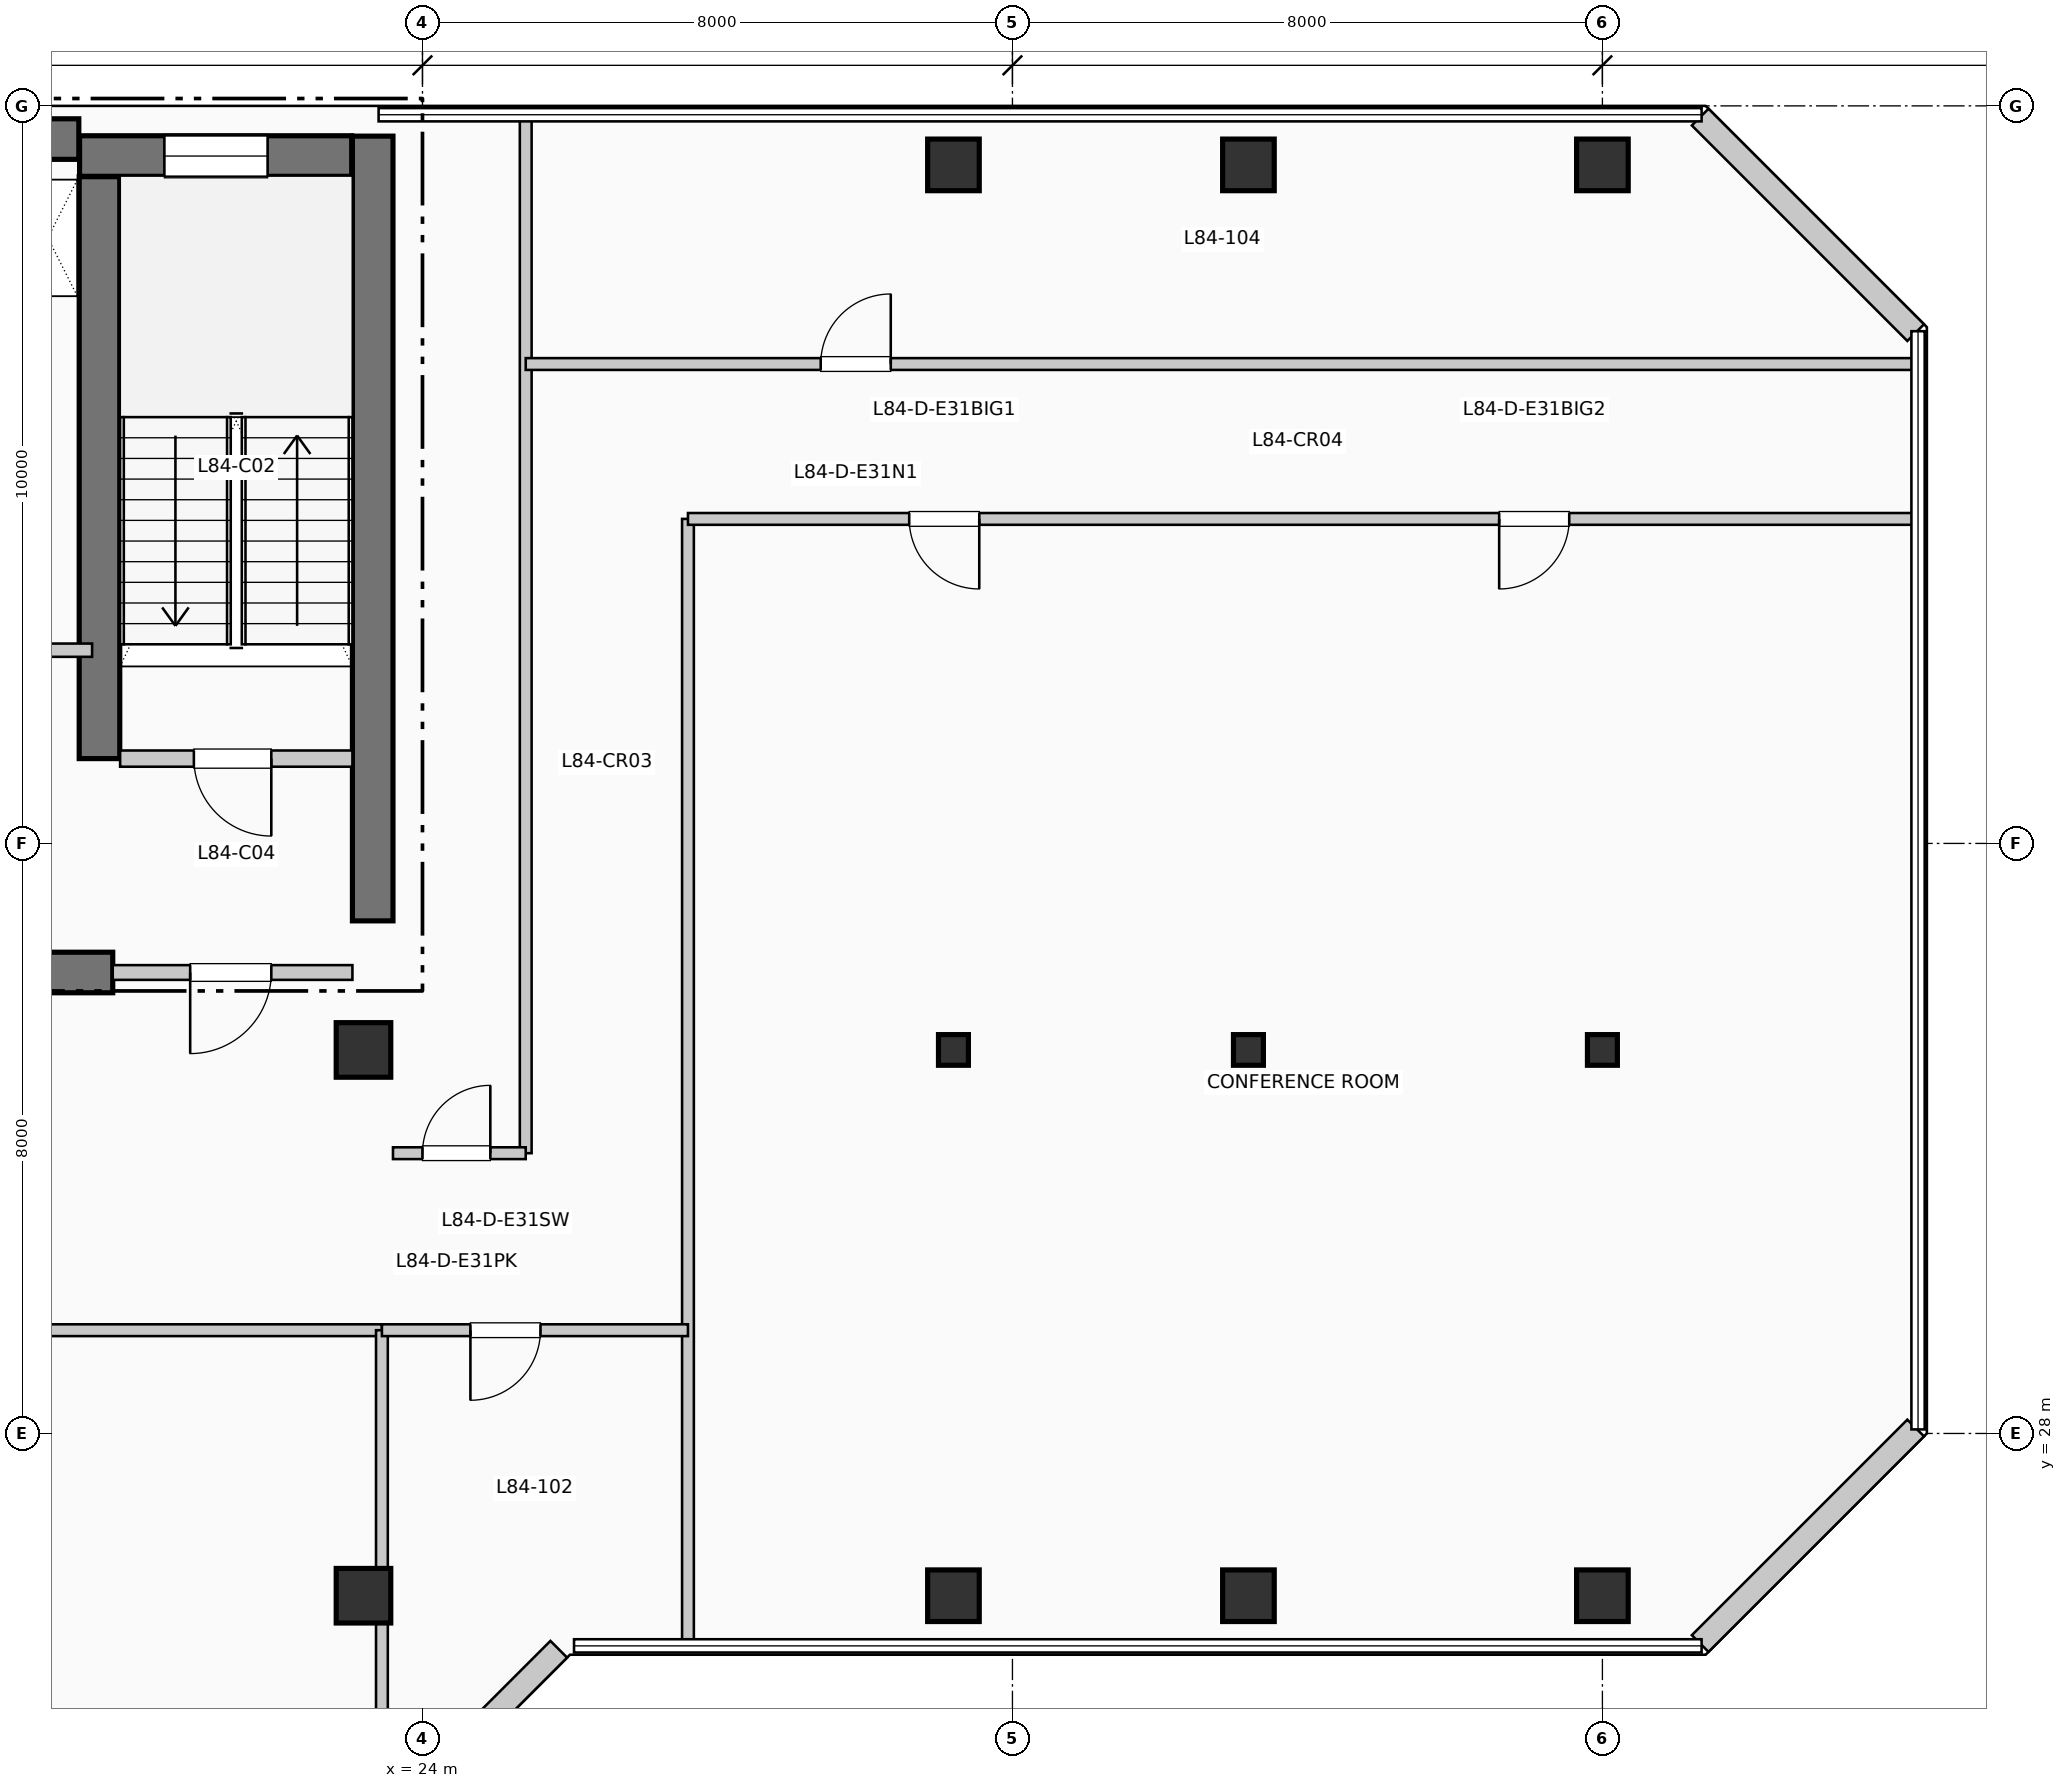
"""IFC4 building model, lengths in metres.
Left out: names, types, materials, properties, quantities, classifications, styles, units other than length and angle.
Written with IfcOpenShell. Run it as: python <this file> out.ifc"""

import sys

from ifc_helpers import new_model, si_unit, direction, frame, frame_2d, origin, origin_2d, place, context, subcontext, project, spatial, rectangle, i_section, extrude, element, fill, save


model = new_model("IFC4")
c1 = context("Model", 3, precision=1e-05, world=origin(), true_north=direction((0.0, 1.0)))
c2 = subcontext(c1, "Body", "Model", "MODEL_VIEW")
j1 = project(units=[si_unit("LENGTHUNIT", "METRE"), si_unit("PLANEANGLEUNIT", "RADIAN")], contexts=[c1])
p1 = place(None, origin())
s1 = spatial("IfcSite", under=j1, at=p1, CompositionType="ELEMENT")
p2 = place(p1, origin())
s2 = spatial("IfcBuilding", under=s1, at=p2, CompositionType="ELEMENT")
p3 = place(p2, frame((0.0, 0.0, 343.53)))
s3 = spatial("IfcBuildingStorey", under=s2, at=p3, CompositionType="ELEMENT", Elevation=343.53)
p4 = place(p3, frame((5.36, 45.55, 0.0), z_axis=(0.0, 0.0, 1.0), x_axis=(1.0, 0.0, 0.0)))
e1 = element("IfcWall", 1, at=p4, inside=s3, PredefinedType="SHEAR", context=c2, shape_type="SweptSolid", body=[
    extrude(rectangle(XDim=13.98, YDim=0.55, at=frame_2d((6.99, 0.0))), origin(), (0.0, 0.0, 1.0), 3.96),
])
p5 = place(p3, frame((23.325, 34.95, 0.0), z_axis=(0.0, 0.0, 1.0), x_axis=(0.0, 1.0, 0.0)))
e2 = element("IfcWall", 2, at=p5, inside=s3, PredefinedType="SHEAR", context=c2, shape_type="SweptSolid", body=[
    extrude(rectangle(XDim=10.64, YDim=0.55, at=frame_2d((5.32, 0.0))), origin(), (0.0, 0.0, 1.0), 3.96),
])
p6 = place(p3, frame((13.68, 34.25, 0.0), z_axis=(0.0, 0.0, 1.0), x_axis=(1.0, 0.0, 0.0)))
e3 = element("IfcWall", 3, at=p6, inside=s3, PredefinedType="SHEAR", context=c2, shape_type="SweptSolid", body=[
    extrude(rectangle(XDim=6.12, YDim=0.55, at=frame_2d((3.06, 0.0))), origin(), (0.0, 0.0, 1.0), 3.96),
])
p7 = place(p3, frame((19.62, 37.15, 0.0), z_axis=(0.0, 0.0, 1.0), x_axis=(0.0, 1.0, 0.0)))
e4 = element("IfcWall", 4, at=p7, inside=s3, PredefinedType="SHEAR", context=c2, shape_type="SweptSolid", body=[
    extrude(rectangle(XDim=7.89, YDim=0.55, at=frame_2d((3.945, 0.0))), origin(), (0.0, 0.0, 1.0), 3.96),
])
p8 = place(p3, frame((19.35, 45.32, 0.0), z_axis=(0.0, 0.0, 1.0), x_axis=(1.0, 0.0, 0.0)))
e5 = element("IfcWall", 5, at=p8, inside=s3, PredefinedType="SHEAR", context=c2, shape_type="SweptSolid", body=[
    extrude(rectangle(XDim=3.69, YDim=0.55, at=frame_2d((1.845, 0.0))), origin(), (0.0, 0.0, 1.0), 3.96),
])
p9 = place(p8, frame((1.15, 0.0, 1.05)))
e6 = element("IfcOpeningElement", 6, at=p9, cuts=e5, PredefinedType="OPENING", context=c2, shape_type="SweptSolid", body=[
    extrude(rectangle(XDim=1.4, YDim=1.8, at=frame_2d((0.7, 0.9))), frame((0.0, 0.285, 0.0), z_axis=(0.0, -1.0, 0.0), x_axis=(1.0, 0.0, 0.0)), (0.0, 0.0, 1.0), 0.57),
])
for number, where, z_axis, x_axis in (
    (7, (23.2, 25.8, 0.0), (0.0, 0.0, 1.0), (1.0, 0.0, 0.0)),
    (8, (23.2, 33.2, 0.0), (0.0, 0.0, 1.0), (1.0, 0.0, 0.0)),
):
    element("IfcColumn", number, at=place(p3, frame(where, z_axis=z_axis, x_axis=x_axis)), inside=s3, PredefinedType="COLUMN", context=c2, shape_type="SweptSolid", body=[
        extrude(rectangle(XDim=0.74, YDim=0.74, at=origin_2d()), origin(), (0.0, 0.0, 1.0), 3.96),
    ])
p10 = place(p3, frame((31.2, 25.8, 0.0), z_axis=(0.0, 0.0, 1.0), x_axis=(1.0, 0.0, 0.0)))
e9 = element("IfcColumn", 9, at=p10, inside=s3, PredefinedType="COLUMN", context=c2, shape_type="SweptSolid", body=[
    extrude(rectangle(XDim=0.7, YDim=0.7, at=origin_2d()), origin(), (0.0, 0.0, 1.0), 3.96),
])
p11 = place(p3, frame((31.2, 33.2, 0.0), z_axis=(0.0, 0.0, 1.0), x_axis=(1.0, 0.0, 0.0)))
e10 = element("IfcColumn", 10, at=p11, inside=s3, PredefinedType="COLUMN", context=c2, shape_type="SweptSolid", body=[
    extrude(i_section(OverallWidth=0.406, OverallDepth=0.416, WebThickness=0.022, FlangeThickness=0.036, at=origin_2d()), origin(), (0.0, 0.0, 1.0), 3.96),
])
for number, where, z_axis, x_axis in (
    (11, (31.2, 45.2, 0.0), (0.0, 0.0, 1.0), (1.0, 0.0, 0.0)),
    (12, (35.2, 25.8, 0.0), (0.0, 0.0, 1.0), (1.0, 0.0, 0.0)),
):
    element("IfcColumn", number, at=place(p3, frame(where, z_axis=z_axis, x_axis=x_axis)), inside=s3, PredefinedType="COLUMN", context=c2, shape_type="SweptSolid", body=[
        extrude(rectangle(XDim=0.7, YDim=0.7, at=origin_2d()), origin(), (0.0, 0.0, 1.0), 3.96),
    ])
p12 = place(p3, frame((35.2, 33.2, 0.0), z_axis=(0.0, 0.0, 1.0), x_axis=(1.0, 0.0, 0.0)))
e13 = element("IfcColumn", 13, at=p12, inside=s3, PredefinedType="COLUMN", context=c2, shape_type="SweptSolid", body=[
    extrude(i_section(OverallWidth=0.406, OverallDepth=0.416, WebThickness=0.022, FlangeThickness=0.036, at=origin_2d()), origin(), (0.0, 0.0, 1.0), 3.96),
])
for number, where, z_axis, x_axis in (
    (14, (35.2, 45.2, 0.0), (0.0, 0.0, 1.0), (1.0, 0.0, 0.0)),
    (15, (40.0, 25.8, 0.0), (0.0, 0.0, 1.0), (1.0, 0.0, 0.0)),
):
    element("IfcColumn", number, at=place(p3, frame(where, z_axis=z_axis, x_axis=x_axis)), inside=s3, PredefinedType="COLUMN", context=c2, shape_type="SweptSolid", body=[
        extrude(rectangle(XDim=0.7, YDim=0.7, at=origin_2d()), origin(), (0.0, 0.0, 1.0), 3.96),
    ])
p13 = place(p3, frame((40.0, 33.2, 0.0), z_axis=(0.0, 0.0, 1.0), x_axis=(1.0, 0.0, 0.0)))
e16 = element("IfcColumn", 16, at=p13, inside=s3, PredefinedType="COLUMN", context=c2, shape_type="SweptSolid", body=[
    extrude(i_section(OverallWidth=0.406, OverallDepth=0.416, WebThickness=0.022, FlangeThickness=0.036, at=origin_2d()), origin(), (0.0, 0.0, 1.0), 3.96),
])
p14 = place(p3, frame((40.0, 45.2, 0.0), z_axis=(0.0, 0.0, 1.0), x_axis=(1.0, 0.0, 0.0)))
e17 = element("IfcColumn", 17, at=p14, inside=s3, PredefinedType="COLUMN", context=c2, shape_type="SweptSolid", body=[
    extrude(rectangle(XDim=0.7, YDim=0.7, at=origin_2d()), origin(), (0.0, 0.0, 1.0), 3.96),
])
p15 = place(p3, frame((23.926, 23.152, 0.0), z_axis=(0.0, 0.0, 1.0), x_axis=(0.707106781187, 0.707106781187, 0.0)))
e18 = element("IfcWall", 18, at=p15, inside=s3, PredefinedType="SOLIDWALL", context=c2, shape_type="SweptSolid", body=[
    extrude(rectangle(XDim=2.718, YDim=0.32, at=frame_2d((1.359, 0.0))), origin(), (0.0, 0.0, 1.0), 3.71),
])
for number, where, z_axis, x_axis in (
    (19, (41.326, 25.152, 0.0), (0.0, 0.0, 1.0), (0.707, 0.707, 0.0)),
    (20, (44.248, 42.926, 0.0), (0.0, 0.0, 1.0), (-0.707, 0.707, 0.0)),
):
    element("IfcWall", number, at=place(p3, frame(where, z_axis=z_axis, x_axis=x_axis)), inside=s3, PredefinedType="SOLIDWALL", context=c2, shape_type="SweptSolid", body=[
        extrude(rectangle(XDim=4.133, YDim=0.32, at=frame_2d((2.066, 0.0))), origin(), (0.0, 0.0, 1.0), 3.71),
    ])
p16 = place(p3, frame((19.9, 37.15, 0.0), z_axis=(0.0, 0.0, 1.0), x_axis=(1.0, 0.0, 0.0)))
e21 = element("IfcWall", 21, at=p16, inside=s3, PredefinedType="PARTITIONING", context=c2, shape_type="SweptSolid", body=[
    extrude(rectangle(XDim=3.15, YDim=0.22, at=frame_2d((1.575, 0.0))), origin(), (0.0, 0.0, 1.0), 3.71),
])
p17 = place(p16, frame((2.05, 0.0, 0.0), z_axis=(0.0, 0.0, 1.0), x_axis=(-1.0, 0.0, 0.0)))
e22 = element("IfcOpeningElement", 22, at=p17, cuts=e21, PredefinedType="OPENING", context=c2, shape_type="SweptSolid", body=[
    extrude(rectangle(XDim=1.05, YDim=2.15, at=frame_2d((0.525, 1.075))), frame((0.0, 0.12, 0.0), z_axis=(0.0, -1.0, 0.0), x_axis=(1.0, 0.0, 0.0)), (0.0, 0.0, 1.0), 0.24),
])
p18 = place(p3, frame((19.8, 34.25, 0.0), z_axis=(0.0, 0.0, 1.0), x_axis=(1.0, 0.0, 0.0)))
e23 = element("IfcWall", 23, at=p18, inside=s3, PredefinedType="PARTITIONING", context=c2, shape_type="SweptSolid", body=[
    extrude(rectangle(XDim=3.25, YDim=0.2, at=frame_2d((1.625, 0.0))), origin(), (0.0, 0.0, 1.0), 3.71),
])
p19 = place(p18, frame((2.15, 0.0, 0.0), z_axis=(0.0, 0.0, 1.0), x_axis=(-1.0, 0.0, 0.0)))
e24 = element("IfcOpeningElement", 24, at=p19, cuts=e23, PredefinedType="OPENING", context=c2, shape_type="SweptSolid", body=[
    extrude(rectangle(XDim=1.1, YDim=2.15, at=frame_2d((0.55, 1.075))), frame((0.0, 0.11, 0.0), z_axis=(0.0, -1.0, 0.0), x_axis=(1.0, 0.0, 0.0)), (0.0, 0.0, 1.0), 0.22),
])
p20 = place(p3, frame((17.68, 38.62, 0.0), z_axis=(0.0, 0.0, 1.0), x_axis=(1.0, 0.0, 0.0)))
e25 = element("IfcWall", 25, at=p20, inside=s3, PredefinedType="PARTITIONING", context=c2, shape_type="SweptSolid", body=[
    extrude(rectangle(XDim=1.84, YDim=0.18, at=frame_2d((0.92, 0.0))), origin(), (0.0, 0.0, 1.0), 3.71),
])
p21 = place(p20, frame((0.24, 0.0, 0.0)))
e26 = element("IfcOpeningElement", 26, at=p21, cuts=e25, PredefinedType="OPENING", context=c2, shape_type="SweptSolid", body=[
    extrude(rectangle(XDim=0.92, YDim=2.1, at=frame_2d((0.46, 1.05))), frame((0.0, 0.1, 0.0), z_axis=(0.0, -1.0, 0.0), x_axis=(1.0, 0.0, 0.0)), (0.0, 0.0, 1.0), 0.2),
])
p22 = place(p3, frame((6.4, 29.4, 0.0), z_axis=(0.0, 0.0, 1.0), x_axis=(1.0, 0.0, 0.0)))
e27 = element("IfcWall", 27, at=p22, inside=s3, PredefinedType="PARTITIONING", context=c2, shape_type="SweptSolid", body=[
    extrude(rectangle(XDim=17.05, YDim=0.16, at=frame_2d((8.525, 0.0))), origin(), (0.0, 0.0, 1.0), 3.395),
])
p23 = place(p3, frame((23.45, 5.99, 0.0), z_axis=(0.0, 0.0, 1.0), x_axis=(0.0, 1.0, 0.0)))
e28 = element("IfcWall", 28, at=p23, inside=s3, PredefinedType="PARTITIONING", context=c2, shape_type="SweptSolid", body=[
    extrude(rectangle(XDim=23.41, YDim=0.16, at=frame_2d((11.705, 0.0))), origin(), (0.0, 0.0, 1.0), 3.145),
])
p24 = place(p3, frame((25.4, 31.8, 0.0), z_axis=(0.0, 0.0, 1.0), x_axis=(0.0, 1.0, 0.0)))
e29 = element("IfcWall", 29, at=p24, inside=s3, PredefinedType="PARTITIONING", context=c2, shape_type="SweptSolid", body=[
    extrude(rectangle(XDim=14.01, YDim=0.16, at=frame_2d((7.005, 0.0))), origin(), (0.0, 0.0, 1.0), 3.71),
])
p25 = place(p3, frame((27.6, 25.19, 0.0), z_axis=(0.0, 0.0, 1.0), x_axis=(0.0, 1.0, 0.0)))
e30 = element("IfcWall", 30, at=p25, inside=s3, PredefinedType="PARTITIONING", context=c2, shape_type="SweptSolid", body=[
    extrude(rectangle(XDim=15.21, YDim=0.16, at=frame_2d((7.605, 0.0))), origin(), (0.0, 0.0, 1.0), 3.71),
])
p26 = place(p3, frame((23.45, 29.4, 0.0), z_axis=(0.0, 0.0, 1.0), x_axis=(1.0, 0.0, 0.0)))
e31 = element("IfcWall", 31, at=p26, inside=s3, PredefinedType="PARTITIONING", context=c2, shape_type="SweptSolid", body=[
    extrude(rectangle(XDim=4.15, YDim=0.16, at=frame_2d((2.075, 0.0))), origin(), (0.0, 0.0, 1.0), 3.395),
])
p27 = place(p26, frame((2.15, 0.0, 0.0), z_axis=(0.0, 0.0, 1.0), x_axis=(-1.0, 0.0, 0.0)))
e32 = element("IfcOpeningElement", 32, at=p27, cuts=e31, PredefinedType="OPENING", context=c2, shape_type="SweptSolid", body=[
    extrude(rectangle(XDim=0.95, YDim=2.15, at=frame_2d((0.475, 1.075))), frame((0.0, 0.09, 0.0), z_axis=(0.0, -1.0, 0.0), x_axis=(1.0, 0.0, 0.0)), (0.0, 0.0, 1.0), 0.18),
])
p28 = place(p3, frame((27.6, 40.4, 0.0), z_axis=(0.0, 0.0, 1.0), x_axis=(1.0, 0.0, 0.0)))
e33 = element("IfcWall", 33, at=p28, inside=s3, PredefinedType="PARTITIONING", context=c2, shape_type="SweptSolid", body=[
    extrude(rectangle(XDim=16.61, YDim=0.16, at=frame_2d((8.305, 0.0))), origin(), (0.0, 0.0, 1.0), 3.71),
])
p29 = place(p28, frame((3.95, 0.0, 0.0), z_axis=(0.0, 0.0, 1.0), x_axis=(-1.0, 0.0, 0.0)))
e34 = element("IfcOpeningElement", 34, at=p29, cuts=e33, PredefinedType="OPENING", context=c2, shape_type="SweptSolid", body=[
    extrude(rectangle(XDim=0.95, YDim=2.15, at=frame_2d((0.475, 1.075))), frame((0.0, 0.09, 0.0), z_axis=(0.0, -1.0, 0.0), x_axis=(1.0, 0.0, 0.0)), (0.0, 0.0, 1.0), 0.18),
])
p30 = place(p28, frame((11.95, 0.0, 0.0), z_axis=(0.0, 0.0, 1.0), x_axis=(-1.0, 0.0, 0.0)))
e35 = element("IfcOpeningElement", 35, at=p30, cuts=e33, PredefinedType="OPENING", context=c2, shape_type="SweptSolid", body=[
    extrude(rectangle(XDim=0.95, YDim=2.15, at=frame_2d((0.475, 1.075))), frame((0.0, 0.09, 0.0), z_axis=(0.0, -1.0, 0.0), x_axis=(1.0, 0.0, 0.0)), (0.0, 0.0, 1.0), 0.18),
])
p31 = place(p3, frame((25.4, 42.5, 0.0), z_axis=(0.0, 0.0, 1.0), x_axis=(1.0, 0.0, 0.0)))
e36 = element("IfcWall", 36, at=p31, inside=s3, PredefinedType="PARTITIONING", context=c2, shape_type="SweptSolid", body=[
    extrude(rectangle(XDim=18.81, YDim=0.16, at=frame_2d((9.405, 0.0))), origin(), (0.0, 0.0, 1.0), 3.71),
])
p32 = place(p31, frame((4.0, 0.0, 0.0)))
e37 = element("IfcOpeningElement", 37, at=p32, cuts=e36, PredefinedType="OPENING", context=c2, shape_type="SweptSolid", body=[
    extrude(rectangle(XDim=0.95, YDim=2.15, at=frame_2d((0.475, 1.075))), frame((0.0, 0.09, 0.0), z_axis=(0.0, -1.0, 0.0), x_axis=(1.0, 0.0, 0.0)), (0.0, 0.0, 1.0), 0.18),
])
p33 = place(p3, frame((23.6, 31.8, 0.0), z_axis=(0.0, 0.0, 1.0), x_axis=(1.0, 0.0, 0.0)))
e38 = element("IfcWall", 38, at=p33, inside=s3, PredefinedType="PARTITIONING", context=c2, shape_type="SweptSolid", body=[
    extrude(rectangle(XDim=1.8, YDim=0.16, at=frame_2d((0.9, 0.0))), origin(), (0.0, 0.0, 1.0), 3.71),
])
p34 = place(p33, frame((0.4, 0.0, 0.0)))
e39 = element("IfcOpeningElement", 39, at=p34, cuts=e38, PredefinedType="OPENING", context=c2, shape_type="SweptSolid", body=[
    extrude(rectangle(XDim=0.92, YDim=2.1, at=frame_2d((0.46, 1.05))), frame((0.0, 0.09, 0.0), z_axis=(0.0, -1.0, 0.0), x_axis=(1.0, 0.0, 0.0)), (0.0, 0.0, 1.0), 0.18),
])
p35 = place(p9, origin())
e40 = element("IfcWindow", 40, at=p35, inside=s3, PartitioningType="SINGLE_PANEL", PredefinedType="WINDOW", context=c2, shape_type="SweptSolid", body=[
    extrude(rectangle(XDim=1.4, YDim=1.8, at=frame_2d((0.7, 0.9))), frame((0.0, 0.03, 0.0), z_axis=(0.0, -1.0, 0.0), x_axis=(1.0, 0.0, 0.0)), (0.0, 0.0, 1.0), 0.06),
])
fill(e6, e40)
p36 = place(p17, origin())
e41 = element("IfcDoor", 41, at=p36, inside=s3, OperationType="SINGLE_SWING_RIGHT", PredefinedType="DOOR", context=c2, shape_type="SweptSolid", body=[
    extrude(rectangle(XDim=1.05, YDim=2.15, at=frame_2d((0.525, 1.075))), frame((0.0, 0.025, 0.0), z_axis=(0.0, -1.0, 0.0), x_axis=(1.0, 0.0, 0.0)), (0.0, 0.0, 1.0), 0.05),
])
fill(e22, e41)
p37 = place(p19, origin())
e42 = element("IfcDoor", 42, at=p37, inside=s3, OperationType="SINGLE_SWING_LEFT", PredefinedType="DOOR", context=c2, shape_type="SweptSolid", body=[
    extrude(rectangle(XDim=1.1, YDim=2.15, at=frame_2d((0.55, 1.075))), frame((0.0, 0.025, 0.0), z_axis=(0.0, -1.0, 0.0), x_axis=(1.0, 0.0, 0.0)), (0.0, 0.0, 1.0), 0.05),
])
fill(e24, e42)
p38 = place(p34, origin())
e43 = element("IfcDoor", 43, at=p38, inside=s3, OperationType="SINGLE_SWING_RIGHT", PredefinedType="DOOR", context=c2, shape_type="SweptSolid", body=[
    extrude(rectangle(XDim=0.92, YDim=2.1, at=frame_2d((0.46, 1.05))), frame((0.0, 0.025, 0.0), z_axis=(0.0, -1.0, 0.0), x_axis=(1.0, 0.0, 0.0)), (0.0, 0.0, 1.0), 0.05),
])
fill(e39, e43)
p39 = place(p27, origin())
e44 = element("IfcDoor", 44, at=p39, inside=s3, OperationType="SINGLE_SWING_LEFT", PredefinedType="DOOR", context=c2, shape_type="SweptSolid", body=[
    extrude(rectangle(XDim=0.95, YDim=2.15, at=frame_2d((0.475, 1.075))), frame((0.0, 0.025, 0.0), z_axis=(0.0, -1.0, 0.0), x_axis=(1.0, 0.0, 0.0)), (0.0, 0.0, 1.0), 0.05),
])
fill(e32, e44)
p40 = place(p29, origin())
e45 = element("IfcDoor", 45, at=p40, inside=s3, OperationType="SINGLE_SWING_RIGHT", PredefinedType="DOOR", context=c2, shape_type="SweptSolid", body=[
    extrude(rectangle(XDim=0.95, YDim=2.15, at=frame_2d((0.475, 1.075))), frame((0.0, 0.025, 0.0), z_axis=(0.0, -1.0, 0.0), x_axis=(1.0, 0.0, 0.0)), (0.0, 0.0, 1.0), 0.05),
])
fill(e34, e45)
p41 = place(p30, origin())
e46 = element("IfcDoor", 46, at=p41, inside=s3, OperationType="SINGLE_SWING_LEFT", PredefinedType="DOOR", context=c2, shape_type="SweptSolid", body=[
    extrude(rectangle(XDim=0.95, YDim=2.15, at=frame_2d((0.475, 1.075))), frame((0.0, 0.025, 0.0), z_axis=(0.0, -1.0, 0.0), x_axis=(1.0, 0.0, 0.0)), (0.0, 0.0, 1.0), 0.05),
])
fill(e35, e46)
p42 = place(p32, origin())
e47 = element("IfcDoor", 47, at=p42, inside=s3, OperationType="SINGLE_SWING_RIGHT", PredefinedType="DOOR", context=c2, shape_type="SweptSolid", body=[
    extrude(rectangle(XDim=0.95, YDim=2.15, at=frame_2d((0.475, 1.075))), frame((0.0, 0.025, 0.0), z_axis=(0.0, -1.0, 0.0), x_axis=(1.0, 0.0, 0.0)), (0.0, 0.0, 1.0), 0.05),
])
fill(e37, e47)
save(model, sys.argv[1])
